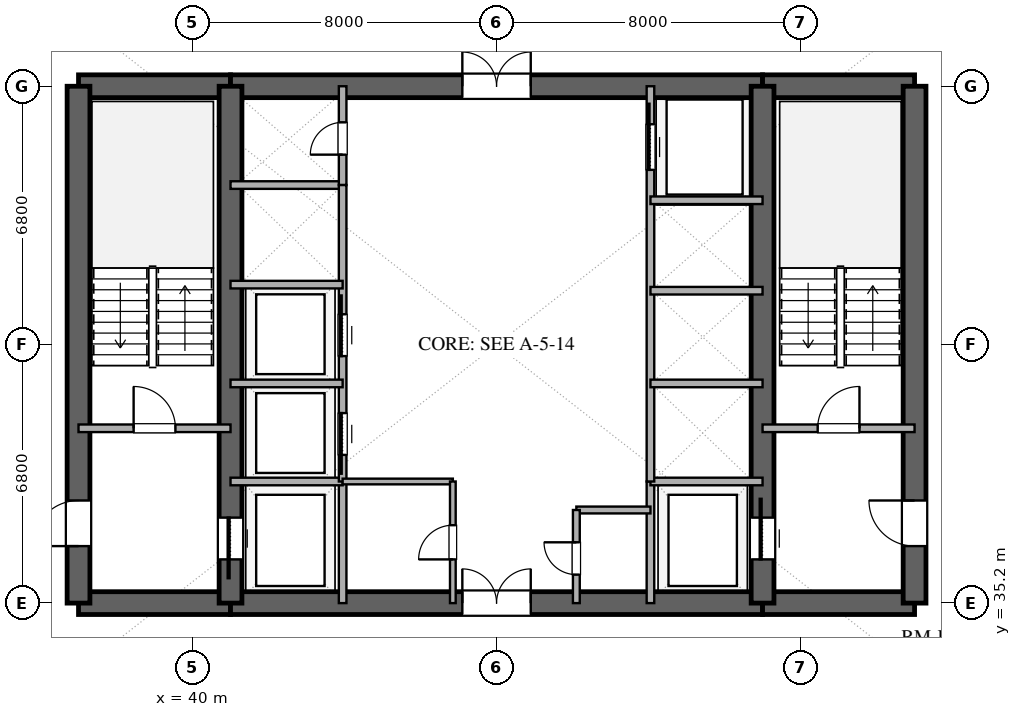
"""IFC4 building model, lengths in metres.
Left out: names, types, materials, properties, quantities, classifications, styles, units other than length and angle.
Written with IfcOpenShell. Run it as: python <this file> out.ifc"""

import sys

from ifc_helpers import new_model, si_unit, direction, frame, frame_2d, origin, place, context, subcontext, project, spatial, rectangle, extrude, element, fill, save


model = new_model("IFC4")
c1 = context("Model", 3, precision=1e-05, world=origin(), true_north=direction((0.0, 1.0)))
c2 = subcontext(c1, "Body", "Model", "MODEL_VIEW")
j1 = project(units=[si_unit("LENGTHUNIT", "METRE"), si_unit("PLANEANGLEUNIT", "RADIAN")], contexts=[c1])
p1 = place(None, origin())
s1 = spatial("IfcSite", under=j1, at=p1, CompositionType="ELEMENT")
p2 = place(p1, origin())
s2 = spatial("IfcBuilding", under=s1, at=p2, CompositionType="ELEMENT")
p3 = place(p2, frame((0.0, 0.0, 75.0)))
s3 = spatial("IfcBuildingStorey", under=s2, at=p3, CompositionType="ELEMENT", Elevation=75.0)
p4 = place(p3, frame((37.0, 35.2, 0.0), z_axis=(0.0, 0.0, 1.0), x_axis=(1.0, 0.0, 0.0)))
e1 = element("IfcWall", 1, at=p4, inside=s3, PredefinedType="SHEAR", context=c2, shape_type="SweptSolid", body=[
    extrude(rectangle(XDim=4.0, YDim=0.6, at=frame_2d((2.0, 0.0))), origin(), (0.0, 0.0, 1.0), 3.25),
])
p5 = place(p3, frame((41.0, 35.2, 0.0), z_axis=(0.0, 0.0, 1.0), x_axis=(1.0, 0.0, 0.0)))
e2 = element("IfcWall", 2, at=p5, inside=s3, PredefinedType="SHEAR", context=c2, shape_type="SweptSolid", body=[
    extrude(rectangle(XDim=14.0, YDim=0.6, at=frame_2d((7.0, 0.0))), origin(), (0.0, 0.0, 1.0), 3.25),
])
p6 = place(p5, frame((6.1, 0.0, 0.0)))
e3 = element("IfcOpeningElement", 3, at=p6, cuts=e2, PredefinedType="OPENING", context=c2, shape_type="SweptSolid", body=[
    extrude(rectangle(XDim=1.8, YDim=2.25, at=frame_2d((0.9, 1.125))), frame((0.0, 0.31, 0.0), z_axis=(0.0, -1.0, 0.0), x_axis=(1.0, 0.0, 0.0)), (0.0, 0.0, 1.0), 0.62),
])
for number, where, z_axis, x_axis in (
    (4, (55.0, 35.2, 0.0), (0.0, 0.0, 1.0), (1.0, 0.0, 0.0)),
    (5, (37.0, 48.8, 0.0), (0.0, 0.0, 1.0), (1.0, 0.0, 0.0)),
):
    element("IfcWall", number, at=place(p3, frame(where, z_axis=z_axis, x_axis=x_axis)), inside=s3, PredefinedType="SHEAR", context=c2, shape_type="SweptSolid", body=[
        extrude(rectangle(XDim=4.0, YDim=0.6, at=frame_2d((2.0, 0.0))), origin(), (0.0, 0.0, 1.0), 3.25),
    ])
p7 = place(p3, frame((41.0, 48.8, 0.0), z_axis=(0.0, 0.0, 1.0), x_axis=(1.0, 0.0, 0.0)))
e6 = element("IfcWall", 6, at=p7, inside=s3, PredefinedType="SHEAR", context=c2, shape_type="SweptSolid", body=[
    extrude(rectangle(XDim=14.0, YDim=0.6, at=frame_2d((7.0, 0.0))), origin(), (0.0, 0.0, 1.0), 3.25),
])
p8 = place(p7, frame((6.1, 0.0, 0.0)))
e7 = element("IfcOpeningElement", 7, at=p8, cuts=e6, PredefinedType="OPENING", context=c2, shape_type="SweptSolid", body=[
    extrude(rectangle(XDim=1.8, YDim=2.25, at=frame_2d((0.9, 1.125))), frame((0.0, 0.31, 0.0), z_axis=(0.0, -1.0, 0.0), x_axis=(1.0, 0.0, 0.0)), (0.0, 0.0, 1.0), 0.62),
])
p9 = place(p3, frame((55.0, 48.8, 0.0), z_axis=(0.0, 0.0, 1.0), x_axis=(1.0, 0.0, 0.0)))
e8 = element("IfcWall", 8, at=p9, inside=s3, PredefinedType="SHEAR", context=c2, shape_type="SweptSolid", body=[
    extrude(rectangle(XDim=4.0, YDim=0.6, at=frame_2d((2.0, 0.0))), origin(), (0.0, 0.0, 1.0), 3.25),
])
p10 = place(p3, frame((37.0, 35.2, 0.0), z_axis=(0.0, 0.0, 1.0), x_axis=(0.0, 1.0, 0.0)))
e9 = element("IfcWall", 9, at=p10, inside=s3, PredefinedType="SHEAR", context=c2, shape_type="SweptSolid", body=[
    extrude(rectangle(XDim=13.6, YDim=0.6, at=frame_2d((6.8, 0.0))), origin(), (0.0, 0.0, 1.0), 3.25),
])
p11 = place(p10, frame((1.5, 0.0, 0.0)))
e10 = element("IfcOpeningElement", 10, at=p11, cuts=e9, PredefinedType="OPENING", context=c2, shape_type="SweptSolid", body=[
    extrude(rectangle(XDim=1.2, YDim=2.15, at=frame_2d((0.6, 1.075))), frame((0.0, 0.31, 0.0), z_axis=(0.0, -1.0, 0.0), x_axis=(1.0, 0.0, 0.0)), (0.0, 0.0, 1.0), 0.62),
])
p12 = place(p3, frame((59.0, 35.2, 0.0), z_axis=(0.0, 0.0, 1.0), x_axis=(0.0, 1.0, 0.0)))
e11 = element("IfcWall", 11, at=p12, inside=s3, PredefinedType="SHEAR", context=c2, shape_type="SweptSolid", body=[
    extrude(rectangle(XDim=13.6, YDim=0.6, at=frame_2d((6.8, 0.0))), origin(), (0.0, 0.0, 1.0), 3.25),
])
p13 = place(p12, frame((1.5, 0.0, 0.0)))
e12 = element("IfcOpeningElement", 12, at=p13, cuts=e11, PredefinedType="OPENING", context=c2, shape_type="SweptSolid", body=[
    extrude(rectangle(XDim=1.2, YDim=2.15, at=frame_2d((0.6, 1.075))), frame((0.0, 0.31, 0.0), z_axis=(0.0, -1.0, 0.0), x_axis=(1.0, 0.0, 0.0)), (0.0, 0.0, 1.0), 0.62),
])
p14 = place(p3, frame((41.0, 35.2, 0.0), z_axis=(0.0, 0.0, 1.0), x_axis=(0.0, 1.0, 0.0)))
e13 = element("IfcWall", 13, at=p14, inside=s3, PredefinedType="SHEAR", context=c2, shape_type="SweptSolid", body=[
    extrude(rectangle(XDim=13.6, YDim=0.6, at=frame_2d((6.8, 0.0))), origin(), (0.0, 0.0, 1.0), 3.25),
])
p15 = place(p14, frame((1.15, 0.0, 0.0)))
e14 = element("IfcOpeningElement", 14, at=p15, cuts=e13, PredefinedType="OPENING", context=c2, shape_type="SweptSolid", body=[
    extrude(rectangle(XDim=1.1, YDim=2.2, at=frame_2d((0.55, 1.1))), frame((0.0, 0.31, 0.0), z_axis=(0.0, -1.0, 0.0), x_axis=(1.0, 0.0, 0.0)), (0.0, 0.0, 1.0), 0.62),
])
p16 = place(p3, frame((55.0, 35.2, 0.0), z_axis=(0.0, 0.0, 1.0), x_axis=(0.0, 1.0, 0.0)))
e15 = element("IfcWall", 15, at=p16, inside=s3, PredefinedType="SHEAR", context=c2, shape_type="SweptSolid", body=[
    extrude(rectangle(XDim=13.6, YDim=0.6, at=frame_2d((6.8, 0.0))), origin(), (0.0, 0.0, 1.0), 3.25),
])
p17 = place(p16, frame((1.15, 0.0, 0.0)))
e16 = element("IfcOpeningElement", 16, at=p17, cuts=e15, PredefinedType="OPENING", context=c2, shape_type="SweptSolid", body=[
    extrude(rectangle(XDim=1.1, YDim=2.2, at=frame_2d((0.55, 1.1))), frame((0.0, 0.31, 0.0), z_axis=(0.0, -1.0, 0.0), x_axis=(1.0, 0.0, 0.0)), (0.0, 0.0, 1.0), 0.62),
])
p18 = place(p3, frame((37.0, 39.8, 0.0), z_axis=(0.0, 0.0, 1.0), x_axis=(1.0, 0.0, 0.0)))
e17 = element("IfcWall", 17, at=p18, inside=s3, PredefinedType="SOLIDWALL", context=c2, shape_type="SweptSolid", body=[
    extrude(rectangle(XDim=4.0, YDim=0.2, at=frame_2d((2.0, 0.0))), origin(), (0.0, 0.0, 1.0), 2.61),
])
p19 = place(p18, frame((1.45, 0.0, 0.0)))
e18 = element("IfcOpeningElement", 18, at=p19, cuts=e17, PredefinedType="OPENING", context=c2, shape_type="SweptSolid", body=[
    extrude(rectangle(XDim=1.1, YDim=2.15, at=frame_2d((0.55, 1.075))), frame((0.0, 0.11, 0.0), z_axis=(0.0, -1.0, 0.0), x_axis=(1.0, 0.0, 0.0)), (0.0, 0.0, 1.0), 0.22),
])
p20 = place(p3, frame((55.0, 39.8, 0.0), z_axis=(0.0, 0.0, 1.0), x_axis=(1.0, 0.0, 0.0)))
e19 = element("IfcWall", 19, at=p20, inside=s3, PredefinedType="SOLIDWALL", context=c2, shape_type="SweptSolid", body=[
    extrude(rectangle(XDim=4.0, YDim=0.2, at=frame_2d((2.0, 0.0))), origin(), (0.0, 0.0, 1.0), 2.61),
])
p21 = place(p20, frame((1.45, 0.0, 0.0)))
e20 = element("IfcOpeningElement", 20, at=p21, cuts=e19, PredefinedType="OPENING", context=c2, shape_type="SweptSolid", body=[
    extrude(rectangle(XDim=1.1, YDim=2.15, at=frame_2d((0.55, 1.075))), frame((0.0, 0.11, 0.0), z_axis=(0.0, -1.0, 0.0), x_axis=(1.0, 0.0, 0.0)), (0.0, 0.0, 1.0), 0.22),
])
p22 = place(p3, frame((43.95, 35.2, 0.0), z_axis=(0.0, 0.0, 1.0), x_axis=(0.0, 1.0, 0.0)))
e21 = element("IfcWall", 21, at=p22, inside=s3, PredefinedType="SOLIDWALL", context=c2, shape_type="SweptSolid", body=[
    extrude(rectangle(XDim=3.2, YDim=0.2, at=frame_2d((1.6, 0.0))), origin(), (0.0, 0.0, 1.0), 2.61),
])
p23 = place(p3, frame((41.0, 38.4, 0.0), z_axis=(0.0, 0.0, 1.0), x_axis=(1.0, 0.0, 0.0)))
e22 = element("IfcWall", 22, at=p23, inside=s3, PredefinedType="SOLIDWALL", context=c2, shape_type="SweptSolid", body=[
    extrude(rectangle(XDim=2.95, YDim=0.2, at=frame_2d((1.475, 0.0))), origin(), (0.0, 0.0, 1.0), 2.61),
])
p24 = place(p3, frame((52.05, 35.2, 0.0), z_axis=(0.0, 0.0, 1.0), x_axis=(0.0, 1.0, 0.0)))
e23 = element("IfcWall", 23, at=p24, inside=s3, PredefinedType="SOLIDWALL", context=c2, shape_type="SweptSolid", body=[
    extrude(rectangle(XDim=3.2, YDim=0.2, at=frame_2d((1.6, 0.0))), origin(), (0.0, 0.0, 1.0), 2.61),
])
for number, where, z_axis, x_axis in (
    (24, (52.05, 38.4, 0.0), (0.0, 0.0, 1.0), (1.0, 0.0, 0.0)),
    (25, (41.0, 46.2, 0.0), (0.0, 0.0, 1.0), (1.0, 0.0, 0.0)),
):
    element("IfcWall", number, at=place(p3, frame(where, z_axis=z_axis, x_axis=x_axis)), inside=s3, PredefinedType="SOLIDWALL", context=c2, shape_type="SweptSolid", body=[
        extrude(rectangle(XDim=2.95, YDim=0.2, at=frame_2d((1.475, 0.0))), origin(), (0.0, 0.0, 1.0), 2.61),
    ])
p25 = place(p3, frame((43.95, 46.2, 0.0), z_axis=(0.0, 0.0, 1.0), x_axis=(0.0, 1.0, 0.0)))
e26 = element("IfcWall", 26, at=p25, inside=s3, PredefinedType="SOLIDWALL", context=c2, shape_type="SweptSolid", body=[
    extrude(rectangle(XDim=2.6, YDim=0.2, at=frame_2d((1.3, 0.0))), origin(), (0.0, 0.0, 1.0), 2.61),
])
p26 = place(p25, frame((0.8, 0.0, 0.0)))
e27 = element("IfcOpeningElement", 27, at=p26, cuts=e26, PredefinedType="OPENING", context=c2, shape_type="SweptSolid", body=[
    extrude(rectangle(XDim=0.85, YDim=2.15, at=frame_2d((0.425, 1.075))), frame((0.0, 0.11, 0.0), z_axis=(0.0, -1.0, 0.0), x_axis=(1.0, 0.0, 0.0)), (0.0, 0.0, 1.0), 0.22),
])
p27 = place(p3, frame((43.95, 38.4, 0.0), z_axis=(0.0, 0.0, 1.0), x_axis=(0.0, 1.0, 0.0)))
e28 = element("IfcWall", 28, at=p27, inside=s3, PredefinedType="SOLIDWALL", context=c2, shape_type="SweptSolid", body=[
    extrude(rectangle(XDim=7.8, YDim=0.2, at=frame_2d((3.9, 0.0))), origin(), (0.0, 0.0, 1.0), 2.61),
])
p28 = place(p27, frame((0.7, 0.0, 0.0)))
e29 = element("IfcOpeningElement", 29, at=p28, cuts=e28, PredefinedType="OPENING", context=c2, shape_type="SweptSolid", body=[
    extrude(rectangle(XDim=1.1, YDim=2.2, at=frame_2d((0.55, 1.1))), frame((0.0, 0.11, 0.0), z_axis=(0.0, -1.0, 0.0), x_axis=(1.0, 0.0, 0.0)), (0.0, 0.0, 1.0), 0.22),
])
p29 = place(p27, frame((3.3, 0.0, 0.0)))
e30 = element("IfcOpeningElement", 30, at=p29, cuts=e28, PredefinedType="OPENING", context=c2, shape_type="SweptSolid", body=[
    extrude(rectangle(XDim=1.1, YDim=2.2, at=frame_2d((0.55, 1.1))), frame((0.0, 0.11, 0.0), z_axis=(0.0, -1.0, 0.0), x_axis=(1.0, 0.0, 0.0)), (0.0, 0.0, 1.0), 0.22),
])
for number, where, z_axis, x_axis in (
    (31, (41.0, 40.98, 0.0), (0.0, 0.0, 1.0), (1.0, 0.0, 0.0)),
    (32, (41.0, 43.58, 0.0), (0.0, 0.0, 1.0), (1.0, 0.0, 0.0)),
):
    element("IfcWall", number, at=place(p3, frame(where, z_axis=z_axis, x_axis=x_axis)), inside=s3, PredefinedType="SOLIDWALL", context=c2, shape_type="SweptSolid", body=[
        extrude(rectangle(XDim=2.95, YDim=0.2, at=frame_2d((1.475, 0.0))), origin(), (0.0, 0.0, 1.0), 2.61),
    ])
p30 = place(p3, frame((52.05, 38.4, 0.0), z_axis=(0.0, 0.0, 1.0), x_axis=(0.0, 1.0, 0.0)))
e33 = element("IfcWall", 33, at=p30, inside=s3, PredefinedType="SOLIDWALL", context=c2, shape_type="SweptSolid", body=[
    extrude(rectangle(XDim=10.4, YDim=0.2, at=frame_2d((5.2, 0.0))), origin(), (0.0, 0.0, 1.0), 2.61),
])
p31 = place(p30, frame((8.2, 0.0, 0.0)))
e34 = element("IfcOpeningElement", 34, at=p31, cuts=e33, PredefinedType="OPENING", context=c2, shape_type="SweptSolid", body=[
    extrude(rectangle(XDim=1.2, YDim=2.2, at=frame_2d((0.6, 1.1))), frame((0.0, 0.11, 0.0), z_axis=(0.0, -1.0, 0.0), x_axis=(1.0, 0.0, 0.0)), (0.0, 0.0, 1.0), 0.22),
])
for number, where, z_axis, x_axis in (
    (35, (52.05, 40.98, 0.0), (0.0, 0.0, 1.0), (1.0, 0.0, 0.0)),
    (36, (52.05, 43.42, 0.0), (0.0, 0.0, 1.0), (1.0, 0.0, 0.0)),
    (37, (52.05, 45.8, 0.0), (0.0, 0.0, 1.0), (1.0, 0.0, 0.0)),
):
    element("IfcWall", number, at=place(p3, frame(where, z_axis=z_axis, x_axis=x_axis)), inside=s3, PredefinedType="SOLIDWALL", context=c2, shape_type="SweptSolid", body=[
        extrude(rectangle(XDim=2.95, YDim=0.2, at=frame_2d((1.475, 0.0))), origin(), (0.0, 0.0, 1.0), 2.61),
    ])
p32 = place(p3, frame((43.95, 38.4, 0.0), z_axis=(0.0, 0.0, 1.0), x_axis=(1.0, 0.0, 0.0)))
e38 = element("IfcWall", 38, at=p32, inside=s3, PredefinedType="PARTITIONING", context=c2, shape_type="SweptSolid", body=[
    extrude(rectangle(XDim=2.9, YDim=0.15, at=frame_2d((1.45, 0.0))), origin(), (0.0, 0.0, 1.0), 2.61),
])
p33 = place(p3, frame((46.85, 35.2, 0.0), z_axis=(0.0, 0.0, 1.0), x_axis=(0.0, 1.0, 0.0)))
e39 = element("IfcWall", 39, at=p33, inside=s3, PredefinedType="PARTITIONING", context=c2, shape_type="SweptSolid", body=[
    extrude(rectangle(XDim=3.2, YDim=0.15, at=frame_2d((1.6, 0.0))), origin(), (0.0, 0.0, 1.0), 2.61),
])
p34 = place(p33, frame((1.15, 0.0, 0.0)))
e40 = element("IfcOpeningElement", 40, at=p34, cuts=e39, PredefinedType="OPENING", context=c2, shape_type="SweptSolid", body=[
    extrude(rectangle(XDim=0.9, YDim=2.15, at=frame_2d((0.45, 1.075))), frame((0.0, 0.085, 0.0), z_axis=(0.0, -1.0, 0.0), x_axis=(1.0, 0.0, 0.0)), (0.0, 0.0, 1.0), 0.17),
])
p35 = place(p3, frame((50.1, 37.65, 0.0), z_axis=(0.0, 0.0, 1.0), x_axis=(1.0, 0.0, 0.0)))
e41 = element("IfcWall", 41, at=p35, inside=s3, PredefinedType="PLUMBINGWALL", context=c2, shape_type="SweptSolid", body=[
    extrude(rectangle(XDim=1.95, YDim=0.18, at=frame_2d((0.975, 0.0))), origin(), (0.0, 0.0, 1.0), 2.61),
])
p36 = place(p3, frame((50.1, 35.2, 0.0), z_axis=(0.0, 0.0, 1.0), x_axis=(0.0, 1.0, 0.0)))
e42 = element("IfcWall", 42, at=p36, inside=s3, PredefinedType="PLUMBINGWALL", context=c2, shape_type="SweptSolid", body=[
    extrude(rectangle(XDim=2.45, YDim=0.18, at=frame_2d((1.225, 0.0))), origin(), (0.0, 0.0, 1.0), 2.61),
])
p37 = place(p36, frame((0.75, 0.0, 0.0)))
e43 = element("IfcOpeningElement", 43, at=p37, cuts=e42, PredefinedType="OPENING", context=c2, shape_type="SweptSolid", body=[
    extrude(rectangle(XDim=0.85, YDim=2.1, at=frame_2d((0.425, 1.05))), frame((0.0, 0.1, 0.0), z_axis=(0.0, -1.0, 0.0), x_axis=(1.0, 0.0, 0.0)), (0.0, 0.0, 1.0), 0.2),
])
p38 = place(p15, origin())
e44 = element("IfcDoor", 44, at=p38, inside=s3, OperationType="SLIDING_TO_LEFT", PredefinedType="DOOR", context=c2, shape_type="SweptSolid", body=[
    extrude(rectangle(XDim=1.1, YDim=2.2, at=frame_2d((0.55, 1.1))), frame((0.0, 0.025, 0.0), z_axis=(0.0, -1.0, 0.0), x_axis=(1.0, 0.0, 0.0)), (0.0, 0.0, 1.0), 0.05),
])
fill(e14, e44)
p39 = place(p17, origin())
e45 = element("IfcDoor", 45, at=p39, inside=s3, OperationType="SLIDING_TO_RIGHT", PredefinedType="DOOR", context=c2, shape_type="SweptSolid", body=[
    extrude(rectangle(XDim=1.1, YDim=2.2, at=frame_2d((0.55, 1.1))), frame((0.0, 0.025, 0.0), z_axis=(0.0, -1.0, 0.0), x_axis=(1.0, 0.0, 0.0)), (0.0, 0.0, 1.0), 0.05),
])
fill(e16, e45)
p40 = place(p11, origin())
e46 = element("IfcDoor", 46, at=p40, inside=s3, OperationType="SINGLE_SWING_LEFT", PredefinedType="DOOR", context=c2, shape_type="SweptSolid", body=[
    extrude(rectangle(XDim=1.2, YDim=2.15, at=frame_2d((0.6, 1.075))), frame((0.0, 0.025, 0.0), z_axis=(0.0, -1.0, 0.0), x_axis=(1.0, 0.0, 0.0)), (0.0, 0.0, 1.0), 0.05),
])
fill(e10, e46)
p41 = place(p13, origin())
e47 = element("IfcDoor", 47, at=p41, inside=s3, OperationType="SINGLE_SWING_RIGHT", PredefinedType="DOOR", context=c2, shape_type="SweptSolid", body=[
    extrude(rectangle(XDim=1.2, YDim=2.15, at=frame_2d((0.6, 1.075))), frame((0.0, 0.025, 0.0), z_axis=(0.0, -1.0, 0.0), x_axis=(1.0, 0.0, 0.0)), (0.0, 0.0, 1.0), 0.05),
])
fill(e12, e47)
p42 = place(p6, origin())
e48 = element("IfcDoor", 48, at=p42, inside=s3, OperationType="DOUBLE_DOOR_SINGLE_SWING", PredefinedType="DOOR", context=c2, shape_type="SweptSolid", body=[
    extrude(rectangle(XDim=1.8, YDim=2.25, at=frame_2d((0.9, 1.125))), frame((0.0, 0.025, 0.0), z_axis=(0.0, -1.0, 0.0), x_axis=(1.0, 0.0, 0.0)), (0.0, 0.0, 1.0), 0.05),
])
fill(e3, e48)
p43 = place(p8, origin())
e49 = element("IfcDoor", 49, at=p43, inside=s3, OperationType="DOUBLE_DOOR_SINGLE_SWING", PredefinedType="DOOR", context=c2, shape_type="SweptSolid", body=[
    extrude(rectangle(XDim=1.8, YDim=2.25, at=frame_2d((0.9, 1.125))), frame((0.0, 0.025, 0.0), z_axis=(0.0, -1.0, 0.0), x_axis=(1.0, 0.0, 0.0)), (0.0, 0.0, 1.0), 0.05),
])
fill(e7, e49)
p44 = place(p19, origin())
e50 = element("IfcDoor", 50, at=p44, inside=s3, OperationType="SINGLE_SWING_LEFT", PredefinedType="DOOR", context=c2, shape_type="SweptSolid", body=[
    extrude(rectangle(XDim=1.1, YDim=2.15, at=frame_2d((0.55, 1.075))), frame((0.0, 0.025, 0.0), z_axis=(0.0, -1.0, 0.0), x_axis=(1.0, 0.0, 0.0)), (0.0, 0.0, 1.0), 0.05),
])
fill(e18, e50)
p45 = place(p21, origin())
e51 = element("IfcDoor", 51, at=p45, inside=s3, OperationType="SINGLE_SWING_RIGHT", PredefinedType="DOOR", context=c2, shape_type="SweptSolid", body=[
    extrude(rectangle(XDim=1.1, YDim=2.15, at=frame_2d((0.55, 1.075))), frame((0.0, 0.025, 0.0), z_axis=(0.0, -1.0, 0.0), x_axis=(1.0, 0.0, 0.0)), (0.0, 0.0, 1.0), 0.05),
])
fill(e20, e51)
p46 = place(p26, origin())
e52 = element("IfcDoor", 52, at=p46, inside=s3, OperationType="SINGLE_SWING_LEFT", PredefinedType="DOOR", context=c2, shape_type="SweptSolid", body=[
    extrude(rectangle(XDim=0.85, YDim=2.15, at=frame_2d((0.425, 1.075))), frame((0.0, 0.025, 0.0), z_axis=(0.0, -1.0, 0.0), x_axis=(1.0, 0.0, 0.0)), (0.0, 0.0, 1.0), 0.05),
])
fill(e27, e52)
p47 = place(p28, origin())
e53 = element("IfcDoor", 53, at=p47, inside=s3, OperationType="SLIDING_TO_LEFT", PredefinedType="DOOR", context=c2, shape_type="SweptSolid", body=[
    extrude(rectangle(XDim=1.1, YDim=2.2, at=frame_2d((0.55, 1.1))), frame((0.0, 0.025, 0.0), z_axis=(0.0, -1.0, 0.0), x_axis=(1.0, 0.0, 0.0)), (0.0, 0.0, 1.0), 0.05),
])
fill(e29, e53)
p48 = place(p29, origin())
e54 = element("IfcDoor", 54, at=p48, inside=s3, OperationType="SLIDING_TO_RIGHT", PredefinedType="DOOR", context=c2, shape_type="SweptSolid", body=[
    extrude(rectangle(XDim=1.1, YDim=2.2, at=frame_2d((0.55, 1.1))), frame((0.0, 0.025, 0.0), z_axis=(0.0, -1.0, 0.0), x_axis=(1.0, 0.0, 0.0)), (0.0, 0.0, 1.0), 0.05),
])
fill(e30, e54)
p49 = place(p31, origin())
e55 = element("IfcDoor", 55, at=p49, inside=s3, OperationType="SLIDING_TO_RIGHT", PredefinedType="DOOR", context=c2, shape_type="SweptSolid", body=[
    extrude(rectangle(XDim=1.2, YDim=2.2, at=frame_2d((0.6, 1.1))), frame((0.0, 0.025, 0.0), z_axis=(0.0, -1.0, 0.0), x_axis=(1.0, 0.0, 0.0)), (0.0, 0.0, 1.0), 0.05),
])
fill(e34, e55)
p50 = place(p34, origin())
e56 = element("IfcDoor", 56, at=p50, inside=s3, OperationType="SINGLE_SWING_LEFT", PredefinedType="DOOR", context=c2, shape_type="SweptSolid", body=[
    extrude(rectangle(XDim=0.9, YDim=2.15, at=frame_2d((0.45, 1.075))), frame((0.0, 0.025, 0.0), z_axis=(0.0, -1.0, 0.0), x_axis=(1.0, 0.0, 0.0)), (0.0, 0.0, 1.0), 0.05),
])
fill(e40, e56)
p51 = place(p37, origin())
e57 = element("IfcDoor", 57, at=p51, inside=s3, OperationType="SINGLE_SWING_RIGHT", PredefinedType="DOOR", context=c2, shape_type="SweptSolid", body=[
    extrude(rectangle(XDim=0.85, YDim=2.1, at=frame_2d((0.425, 1.05))), frame((0.0, 0.025, 0.0), z_axis=(0.0, -1.0, 0.0), x_axis=(1.0, 0.0, 0.0)), (0.0, 0.0, 1.0), 0.05),
])
fill(e43, e57)
save(model, sys.argv[1])
